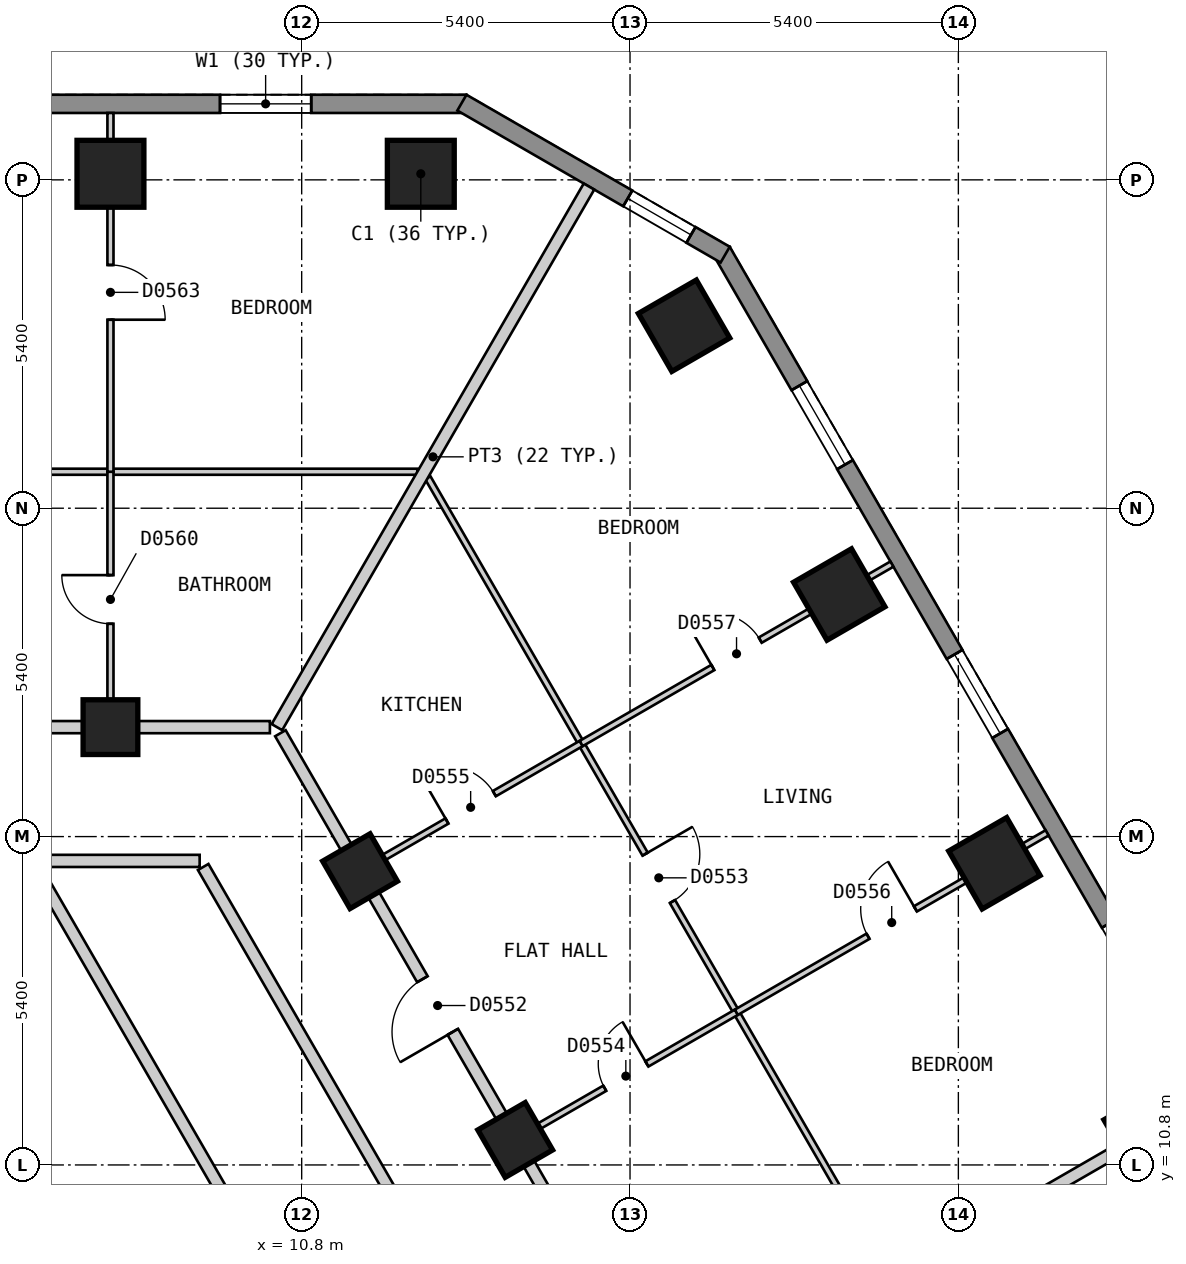
"""IFC4 building model, lengths in metres.
Left out: names, types, materials, properties, quantities, classifications, styles, units other than length and angle.
Written with IfcOpenShell. Run it as: python <this file> out.ifc"""

import sys

from ifc_helpers import new_model, si_unit, direction, frame, frame_2d, origin, origin_2d, place, context, subcontext, project, spatial, polyline, rectangle, outline, extrude, element, fill, save


model = new_model("IFC4")
c1 = context("Model", 3, precision=1e-05, world=origin(), true_north=direction((0.0, 1.0)))
c2 = subcontext(c1, "Body", "Model", "MODEL_VIEW")
j1 = project(units=[si_unit("LENGTHUNIT", "METRE"), si_unit("PLANEANGLEUNIT", "RADIAN")], contexts=[c1])
p1 = place(None, origin())
s1 = spatial("IfcSite", under=j1, at=p1, CompositionType="ELEMENT")
p2 = place(p1, origin())
s2 = spatial("IfcBuilding", under=s1, at=p2, CompositionType="ELEMENT")
p3 = place(p2, frame((0.0, 0.0, 56.4)))
s3 = spatial("IfcBuildingStorey", under=s2, at=p3, CompositionType="ELEMENT", Elevation=56.4)
for number, where, z_axis, x_axis in (
    (1, (12.759, 27.1, 0.0), (0.0, 0.0, 1.0), (-1.0, 0.0, 0.0)),
    (2, (7.655, 27.1, 0.0), (0.0, 0.0, 1.0), (-1.0, 0.0, 0.0)),
    (3, (24.745, 11.341, 0.0), (0.0, 0.0, 1.0), (-0.5, 0.866, 0.0)),
    (4, (22.193, 15.761, 0.0), (0.0, 0.0, 1.0), (-0.5, 0.866, 0.0)),
    (5, (19.641, 20.181, 0.0), (0.0, 0.0, 1.0), (-0.5, 0.866, 0.0)),
    (6, (17.089, 24.601, 0.0), (0.0, 0.0, 1.0), (-0.5, 0.866, 0.0)),
):
    element("IfcColumn", number, at=place(p3, frame(where, z_axis=z_axis, x_axis=x_axis)), inside=s3, PredefinedType="COLUMN", context=c2, shape_type="SweptSolid", body=[
        extrude(rectangle(XDim=1.1, YDim=1.1, at=origin_2d()), origin(), (0.0, 0.0, 1.0), 3.0),
    ])
for number, where, z_axis, x_axis in (
    (7, (14.312, 11.211, 0.0), (0.0, 0.0, 1.0), (-0.5, 0.866, 0.0)),
    (8, (11.76, 15.631, 0.0), (0.0, 0.0, 1.0), (-0.5, 0.866, 0.0)),
    (9, (7.655, 18.0, 0.0), (0.0, 0.0, 1.0), (-1.0, 0.0, 0.0)),
):
    element("IfcColumn", number, at=place(p3, frame(where, z_axis=z_axis, x_axis=x_axis)), inside=s3, PredefinedType="COLUMN", context=c2, shape_type="SweptSolid", body=[
        extrude(rectangle(XDim=0.9, YDim=0.9, at=origin_2d()), origin(), (0.0, 0.0, 1.0), 3.0),
    ])
p4 = place(p3, frame((13.51, 28.25, 0.0), z_axis=(0.0, 0.0, 1.0), x_axis=(-1.0, 0.0, 0.0)))
e10 = element("IfcWall", 10, at=p4, inside=s3, PredefinedType="SOLIDWALL", context=c2, shape_type="SweptSolid", body=[
    extrude(outline(polyline([(0.0, -0.15), (27.02, -0.15), (26.94, 0.15), (0.08, 0.15), (0.0, -0.15)])), origin(), (0.0, 0.0, 1.0), 2.7),
])
p5 = place(p4, frame((2.553, 0.0, 0.15)))
e11 = element("IfcOpeningElement", 11, at=p5, cuts=e10, PredefinedType="OPENING", context=c2, shape_type="SweptSolid", body=[
    extrude(rectangle(XDim=1.5, YDim=2.1, at=frame_2d((0.75, 1.05))), frame((0.0, 0.16, 0.0), z_axis=(0.0, -1.0, 0.0), x_axis=(1.0, 0.0, 0.0)), (0.0, 0.0, 1.0), 0.32),
])
p6 = place(p4, frame((7.657, 0.0, 0.15)))
e12 = element("IfcOpeningElement", 12, at=p6, cuts=e10, PredefinedType="OPENING", context=c2, shape_type="SweptSolid", body=[
    extrude(rectangle(XDim=1.5, YDim=2.1, at=frame_2d((0.75, 1.05))), frame((0.0, 0.16, 0.0), z_axis=(0.0, -1.0, 0.0), x_axis=(1.0, 0.0, 0.0)), (0.0, 0.0, 1.0), 0.32),
])
p7 = place(p4, frame((12.761, 0.0, 0.15)))
e13 = element("IfcOpeningElement", 13, at=p7, cuts=e10, PredefinedType="OPENING", context=c2, shape_type="SweptSolid", body=[
    extrude(rectangle(XDim=1.5, YDim=2.1, at=frame_2d((0.75, 1.05))), frame((0.0, 0.16, 0.0), z_axis=(0.0, -1.0, 0.0), x_axis=(1.0, 0.0, 0.0)), (0.0, 0.0, 1.0), 0.32),
])
p8 = place(p4, frame((17.865, 0.0, 0.15)))
e14 = element("IfcOpeningElement", 14, at=p8, cuts=e10, PredefinedType="OPENING", context=c2, shape_type="SweptSolid", body=[
    extrude(rectangle(XDim=1.5, YDim=2.1, at=frame_2d((0.75, 1.05))), frame((0.0, 0.16, 0.0), z_axis=(0.0, -1.0, 0.0), x_axis=(1.0, 0.0, 0.0)), (0.0, 0.0, 1.0), 0.32),
])
p9 = place(p4, frame((22.969, 0.0, 0.15)))
e15 = element("IfcOpeningElement", 15, at=p9, cuts=e10, PredefinedType="OPENING", context=c2, shape_type="SweptSolid", body=[
    extrude(rectangle(XDim=1.5, YDim=2.1, at=frame_2d((0.75, 1.05))), frame((0.0, 0.16, 0.0), z_axis=(0.0, -1.0, 0.0), x_axis=(1.0, 0.0, 0.0)), (0.0, 0.0, 1.0), 0.32),
])
p10 = place(p3, frame((31.22, 2.425, 0.0), z_axis=(0.0, 0.0, 1.0), x_axis=(-0.500001938803, 0.866024284413, 0.0)))
e16 = element("IfcWall", 16, at=p10, inside=s3, PredefinedType="SOLIDWALL", context=c2, shape_type="SweptSolid", body=[
    extrude(outline(polyline([(0.0, -0.15), (27.02, -0.15), (26.94, 0.15), (0.08, 0.15), (0.0, -0.15)])), origin(), (0.0, 0.0, 1.0), 2.7),
])
p11 = place(p10, frame((2.553, 0.0, 0.15)))
e17 = element("IfcOpeningElement", 17, at=p11, cuts=e16, PredefinedType="OPENING", context=c2, shape_type="SweptSolid", body=[
    extrude(rectangle(XDim=1.5, YDim=2.1, at=frame_2d((0.75, 1.05))), frame((0.0, 0.16, 0.0), z_axis=(0.0, -1.0, 0.0), x_axis=(1.0, 0.0, 0.0)), (0.0, 0.0, 1.0), 0.32),
])
p12 = place(p10, frame((7.657, 0.0, 0.15)))
e18 = element("IfcOpeningElement", 18, at=p12, cuts=e16, PredefinedType="OPENING", context=c2, shape_type="SweptSolid", body=[
    extrude(rectangle(XDim=1.5, YDim=2.1, at=frame_2d((0.75, 1.05))), frame((0.0, 0.16, 0.0), z_axis=(0.0, -1.0, 0.0), x_axis=(1.0, 0.0, 0.0)), (0.0, 0.0, 1.0), 0.32),
])
p13 = place(p10, frame((12.761, 0.0, 0.15)))
e19 = element("IfcOpeningElement", 19, at=p13, cuts=e16, PredefinedType="OPENING", context=c2, shape_type="SweptSolid", body=[
    extrude(rectangle(XDim=1.5, YDim=2.1, at=frame_2d((0.75, 1.05))), frame((0.0, 0.16, 0.0), z_axis=(0.0, -1.0, 0.0), x_axis=(1.0, 0.0, 0.0)), (0.0, 0.0, 1.0), 0.32),
])
p14 = place(p10, frame((17.865, 0.0, 0.15)))
e20 = element("IfcOpeningElement", 20, at=p14, cuts=e16, PredefinedType="OPENING", context=c2, shape_type="SweptSolid", body=[
    extrude(rectangle(XDim=1.5, YDim=2.1, at=frame_2d((0.75, 1.05))), frame((0.0, 0.16, 0.0), z_axis=(0.0, -1.0, 0.0), x_axis=(1.0, 0.0, 0.0)), (0.0, 0.0, 1.0), 0.32),
])
p15 = place(p10, frame((22.969, 0.0, 0.15)))
e21 = element("IfcOpeningElement", 21, at=p15, cuts=e16, PredefinedType="OPENING", context=c2, shape_type="SweptSolid", body=[
    extrude(rectangle(XDim=1.5, YDim=2.1, at=frame_2d((0.75, 1.05))), frame((0.0, 0.16, 0.0), z_axis=(0.0, -1.0, 0.0), x_axis=(1.0, 0.0, 0.0)), (0.0, 0.0, 1.0), 0.32),
])
p16 = place(p3, frame((17.765, 25.77, 0.0), z_axis=(0.0, 0.0, 1.0), x_axis=(-0.866010750942, 0.50002537861, 0.0)))
e22 = element("IfcWall", 22, at=p16, inside=s3, PredefinedType="SOLIDWALL", context=c2, shape_type="SweptSolid", body=[
    extrude(outline(polyline([(0.0, -0.15), (5.0, -0.15), (4.919, 0.15), (0.08, 0.15), (0.0, -0.15)])), origin(), (0.0, 0.0, 1.0), 2.7),
])
p17 = place(p16, frame((0.65, 0.0, 0.15)))
e23 = element("IfcOpeningElement", 23, at=p17, cuts=e22, PredefinedType="OPENING", context=c2, shape_type="SweptSolid", body=[
    extrude(rectangle(XDim=1.2, YDim=2.1, at=frame_2d((0.6, 1.05))), frame((0.0, 0.16, 0.0), z_axis=(0.0, -1.0, 0.0), x_axis=(1.0, 0.0, 0.0)), (0.0, 0.0, 1.0), 0.32),
])
p18 = place(p3, frame((6.409, 15.7, 0.0), z_axis=(0.0, 0.0, 1.0), x_axis=(0.499930377127, -0.866065596838, 0.0)))
e24 = element("IfcWall", 24, at=p18, inside=s3, PredefinedType="PARTITIONING", context=c2, shape_type="SweptSolid", body=[
    extrude(rectangle(XDim=8.775, YDim=0.2, at=frame_2d((4.388, 0.0))), origin(), (0.0, 0.0, 1.0), 2.7),
])
p19 = place(p3, frame((9.18, 15.7, 0.0), z_axis=(0.0, 0.0, 1.0), x_axis=(0.500003652032, -0.866023295272, 0.0)))
e25 = element("IfcWall", 25, at=p19, inside=s3, PredefinedType="PARTITIONING", context=c2, shape_type="SweptSolid", body=[
    extrude(rectangle(XDim=18.012, YDim=0.2, at=frame_2d((9.006, 0.0))), origin(), (0.0, 0.0, 1.0), 2.7),
])
p20 = place(p19, frame((8.556, 0.0, 0.0)))
e26 = element("IfcOpeningElement", 26, at=p20, cuts=e25, PredefinedType="OPENING", context=c2, shape_type="SweptSolid", body=[
    extrude(rectangle(XDim=0.9, YDim=2.1, at=frame_2d((0.45, 1.05))), frame((0.0, 0.11, 0.0), z_axis=(0.0, -1.0, 0.0), x_axis=(1.0, 0.0, 0.0)), (0.0, 0.0, 1.0), 0.22),
])
p21 = place(p3, frame((10.45, 17.9, 0.0), z_axis=(0.0, 0.0, 1.0), x_axis=(0.500034352617, -0.866005569383, 0.0)))
e27 = element("IfcWall", 27, at=p21, inside=s3, PredefinedType="PARTITIONING", context=c2, shape_type="SweptSolid", body=[
    extrude(rectangle(XDim=20.553, YDim=0.2, at=frame_2d((10.276, 0.0))), origin(), (0.0, 0.0, 1.0), 2.7),
])
p22 = place(p21, frame((14.902, 0.0, 0.0)))
e28 = element("IfcOpeningElement", 28, at=p22, cuts=e27, PredefinedType="OPENING", context=c2, shape_type="SweptSolid", body=[
    extrude(rectangle(XDim=1.0, YDim=2.1, at=frame_2d((0.5, 1.05))), frame((0.0, 0.11, 0.0), z_axis=(0.0, -1.0, 0.0), x_axis=(1.0, 0.0, 0.0)), (0.0, 0.0, 1.0), 0.22),
])
p23 = place(p21, frame((4.671, 0.0, 0.0)))
e29 = element("IfcOpeningElement", 29, at=p23, cuts=e27, PredefinedType="OPENING", context=c2, shape_type="SweptSolid", body=[
    extrude(rectangle(XDim=1.0, YDim=2.1, at=frame_2d((0.5, 1.05))), frame((0.0, 0.11, 0.0), z_axis=(0.0, -1.0, 0.0), x_axis=(1.0, 0.0, 0.0)), (0.0, 0.0, 1.0), 0.22),
])
p24 = place(p3, frame((6.351, 15.8, 0.0), z_axis=(0.0, 0.0, 1.0), x_axis=(1.0, 0.0, 0.0)))
e30 = element("IfcWall", 30, at=p24, inside=s3, PredefinedType="PARTITIONING", context=c2, shape_type="SweptSolid", body=[
    extrude(rectangle(XDim=2.771, YDim=0.2, at=frame_2d((1.385, 0.0))), origin(), (0.0, 0.0, 1.0), 2.7),
])
p25 = place(p3, frame((-10.276, 18.0, 0.0), z_axis=(0.0, 0.0, 1.0), x_axis=(1.0, 0.0, 0.0)))
e31 = element("IfcWall", 31, at=p25, inside=s3, PredefinedType="PARTITIONING", context=c2, shape_type="SweptSolid", body=[
    extrude(rectangle(XDim=20.553, YDim=0.2, at=frame_2d((10.276, 0.0))), origin(), (0.0, 0.0, 1.0), 2.7),
])
p26 = place(p25, frame((14.879, 0.0, 0.0)))
e32 = element("IfcOpeningElement", 32, at=p26, cuts=e31, PredefinedType="OPENING", context=c2, shape_type="SweptSolid", body=[
    extrude(rectangle(XDim=1.0, YDim=2.1, at=frame_2d((0.5, 1.05))), frame((0.0, 0.11, 0.0), z_axis=(0.0, -1.0, 0.0), x_axis=(1.0, 0.0, 0.0)), (0.0, 0.0, 1.0), 0.22),
])
p27 = place(p25, frame((4.671, 0.0, 0.0)))
e33 = element("IfcOpeningElement", 33, at=p27, cuts=e31, PredefinedType="OPENING", context=c2, shape_type="SweptSolid", body=[
    extrude(rectangle(XDim=1.0, YDim=2.1, at=frame_2d((0.5, 1.05))), frame((0.0, 0.11, 0.0), z_axis=(0.0, -1.0, 0.0), x_axis=(1.0, 0.0, 0.0)), (0.0, 0.0, 1.0), 0.22),
])
p28 = place(p3, frame((12.875, 22.1, 0.0), z_axis=(0.0, 0.0, 1.0), x_axis=(0.499994897061, -0.866028349948, 0.0)))
e34 = element("IfcWall", 34, at=p28, inside=s3, PredefinedType="PARTITIONING", context=c2, shape_type="SweptSolid", body=[
    extrude(rectangle(XDim=15.152, YDim=0.1, at=frame_2d((7.576, 0.0))), origin(), (0.0, 0.0, 1.0), 2.7),
])
p29 = place(p28, frame((7.146, 0.0, 0.0)))
e35 = element("IfcOpeningElement", 35, at=p29, cuts=e34, PredefinedType="OPENING", context=c2, shape_type="SweptSolid", body=[
    extrude(rectangle(XDim=0.9, YDim=2.1, at=frame_2d((0.45, 1.05))), frame((0.0, 0.06, 0.0), z_axis=(0.0, -1.0, 0.0), x_axis=(1.0, 0.0, 0.0)), (0.0, 0.0, 1.0), 0.12),
])
p30 = place(p3, frame((-2.453, 22.2, 0.0), z_axis=(0.0, 0.0, 1.0), x_axis=(1.0, 0.0, 0.0)))
e36 = element("IfcWall", 36, at=p30, inside=s3, PredefinedType="PARTITIONING", context=c2, shape_type="SweptSolid", body=[
    extrude(rectangle(XDim=15.155, YDim=0.1, at=frame_2d((7.577, 0.0))), origin(), (0.0, 0.0, 1.0), 2.7),
])
p31 = place(p30, frame((7.106, 0.0, 0.0)))
e37 = element("IfcOpeningElement", 37, at=p31, cuts=e36, PredefinedType="OPENING", context=c2, shape_type="SweptSolid", body=[
    extrude(rectangle(XDim=0.9, YDim=2.1, at=frame_2d((0.45, 1.05))), frame((0.0, 0.06, 0.0), z_axis=(0.0, -1.0, 0.0), x_axis=(1.0, 0.0, 0.0)), (0.0, 0.0, 1.0), 0.12),
])
p32 = place(p3, frame((7.655, 18.1, 0.0), z_axis=(0.0, 0.0, 1.0), x_axis=(0.0, 1.0, 0.0)))
e38 = element("IfcWall", 38, at=p32, inside=s3, PredefinedType="PARTITIONING", context=c2, shape_type="SweptSolid", body=[
    extrude(rectangle(XDim=4.1, YDim=0.1, at=frame_2d((2.05, 0.0))), origin(), (0.0, 0.0, 1.0), 2.7),
])
p33 = place(p32, frame((1.6, 0.0, 0.0)))
e39 = element("IfcOpeningElement", 39, at=p33, cuts=e38, PredefinedType="OPENING", context=c2, shape_type="SweptSolid", body=[
    extrude(rectangle(XDim=0.8, YDim=2.1, at=frame_2d((0.4, 1.05))), frame((0.0, 0.06, 0.0), z_axis=(0.0, -1.0, 0.0), x_axis=(1.0, 0.0, 0.0)), (0.0, 0.0, 1.0), 0.12),
])
p34 = place(p3, frame((11.847, 15.681, 0.0), z_axis=(0.0, 0.0, 1.0), x_axis=(0.865980278416, 0.500078151287, 0.0)))
e40 = element("IfcWall", 40, at=p34, inside=s3, PredefinedType="PARTITIONING", context=c2, shape_type="SweptSolid", body=[
    extrude(rectangle(XDim=4.099, YDim=0.1, at=frame_2d((2.05, 0.0))), origin(), (0.0, 0.0, 1.0), 2.7),
])
p35 = place(p34, frame((1.55, 0.0, 0.0)))
e41 = element("IfcOpeningElement", 41, at=p35, cuts=e40, PredefinedType="OPENING", context=c2, shape_type="SweptSolid", body=[
    extrude(rectangle(XDim=0.9, YDim=2.1, at=frame_2d((0.45, 1.05))), frame((0.0, 0.06, 0.0), z_axis=(0.0, -1.0, 0.0), x_axis=(1.0, 0.0, 0.0)), (0.0, 0.0, 1.0), 0.12),
])
p36 = place(p3, frame((14.399, 11.261, 0.0), z_axis=(0.0, 0.0, 1.0), x_axis=(0.865980278416, 0.500078151287, 0.0)))
e42 = element("IfcWall", 42, at=p36, inside=s3, PredefinedType="PARTITIONING", context=c2, shape_type="SweptSolid", body=[
    extrude(rectangle(XDim=4.099, YDim=0.1, at=frame_2d((2.05, 0.0))), origin(), (0.0, 0.0, 1.0), 2.7),
])
p37 = place(p36, frame((1.6, 0.0, 0.0)))
e43 = element("IfcOpeningElement", 43, at=p37, cuts=e42, PredefinedType="OPENING", context=c2, shape_type="SweptSolid", body=[
    extrude(rectangle(XDim=0.8, YDim=2.1, at=frame_2d((0.4, 1.05))), frame((0.0, 0.06, 0.0), z_axis=(0.0, -1.0, 0.0), x_axis=(1.0, 0.0, 0.0)), (0.0, 0.0, 1.0), 0.12),
])
p38 = place(p3, frame((10.393, 18.0, 0.0), z_axis=(0.0, 0.0, 1.0), x_axis=(0.499945497007, 0.866056868816, 0.0)))
e44 = element("IfcWall", 44, at=p38, inside=s3, PredefinedType="PARTITIONING", context=c2, shape_type="SweptSolid", body=[
    extrude(rectangle(XDim=10.265, YDim=0.2, at=frame_2d((5.132, 0.0))), origin(), (0.0, 0.0, 1.0), 2.7),
])
p39 = place(p3, frame((20.484, 8.881, 0.0), z_axis=(0.0, 0.0, 1.0), x_axis=(0.866000821391, 0.500042575537, 0.0)))
e45 = element("IfcWall", 45, at=p39, inside=s3, PredefinedType="PARTITIONING", context=c2, shape_type="SweptSolid", body=[
    extrude(rectangle(XDim=5.919, YDim=0.2, at=frame_2d((2.96, 0.0))), origin(), (0.0, 0.0, 1.0), 2.7),
])
p40 = place(p3, frame((15.397, 17.731, 0.0), z_axis=(0.0, 0.0, 1.0), x_axis=(0.866052608538, 0.499952877023, 0.0)))
e46 = element("IfcWall", 46, at=p40, inside=s3, PredefinedType="PARTITIONING", context=c2, shape_type="SweptSolid", body=[
    extrude(rectangle(XDim=5.9, YDim=0.1, at=frame_2d((2.95, 0.0))), origin(), (0.0, 0.0, 1.0), 2.7),
])
p41 = place(p40, frame((2.5, 0.0, 0.0)))
e47 = element("IfcOpeningElement", 47, at=p41, cuts=e46, PredefinedType="OPENING", context=c2, shape_type="SweptSolid", body=[
    extrude(rectangle(XDim=0.9, YDim=2.1, at=frame_2d((0.45, 1.05))), frame((0.0, 0.06, 0.0), z_axis=(0.0, -1.0, 0.0), x_axis=(1.0, 0.0, 0.0)), (0.0, 0.0, 1.0), 0.12),
])
p42 = place(p3, frame((17.949, 13.311, 0.0), z_axis=(0.0, 0.0, 1.0), x_axis=(0.866052608538, 0.499952877023, 0.0)))
e48 = element("IfcWall", 48, at=p42, inside=s3, PredefinedType="PARTITIONING", context=c2, shape_type="SweptSolid", body=[
    extrude(rectangle(XDim=5.9, YDim=0.1, at=frame_2d((2.95, 0.0))), origin(), (0.0, 0.0, 1.0), 2.7),
])
p43 = place(p42, frame((2.5, 0.0, 0.0)))
e49 = element("IfcOpeningElement", 49, at=p43, cuts=e48, PredefinedType="OPENING", context=c2, shape_type="SweptSolid", body=[
    extrude(rectangle(XDim=0.9, YDim=2.1, at=frame_2d((0.45, 1.05))), frame((0.0, 0.06, 0.0), z_axis=(0.0, -1.0, 0.0), x_axis=(1.0, 0.0, 0.0)), (0.0, 0.0, 1.0), 0.12),
])
p44 = place(p3, frame((7.655, 22.2, 0.0), z_axis=(0.0, 0.0, 1.0), x_axis=(0.0, 1.0, 0.0)))
e50 = element("IfcWall", 50, at=p44, inside=s3, PredefinedType="PARTITIONING", context=c2, shape_type="SweptSolid", body=[
    extrude(rectangle(XDim=5.9, YDim=0.1, at=frame_2d((2.95, 0.0))), origin(), (0.0, 0.0, 1.0), 2.7),
])
p45 = place(p44, frame((2.5, 0.0, 0.0)))
e51 = element("IfcOpeningElement", 51, at=p45, cuts=e50, PredefinedType="OPENING", context=c2, shape_type="SweptSolid", body=[
    extrude(rectangle(XDim=0.9, YDim=2.1, at=frame_2d((0.45, 1.05))), frame((0.0, 0.06, 0.0), z_axis=(0.0, -1.0, 0.0), x_axis=(1.0, 0.0, 0.0)), (0.0, 0.0, 1.0), 0.12),
])
p46 = place(p5, origin())
e52 = element("IfcWindow", 52, at=p46, inside=s3, PartitioningType="SINGLE_PANEL", PredefinedType="WINDOW", context=c2, shape_type="SweptSolid", body=[
    extrude(rectangle(XDim=1.5, YDim=2.1, at=frame_2d((0.75, 1.05))), frame((0.0, 0.03, 0.0), z_axis=(0.0, -1.0, 0.0), x_axis=(1.0, 0.0, 0.0)), (0.0, 0.0, 1.0), 0.06),
])
fill(e11, e52)
p47 = place(p14, origin())
e53 = element("IfcWindow", 53, at=p47, inside=s3, PartitioningType="SINGLE_PANEL", PredefinedType="WINDOW", context=c2, shape_type="SweptSolid", body=[
    extrude(rectangle(XDim=1.5, YDim=2.1, at=frame_2d((0.75, 1.05))), frame((0.0, 0.03, 0.0), z_axis=(0.0, -1.0, 0.0), x_axis=(1.0, 0.0, 0.0)), (0.0, 0.0, 1.0), 0.06),
])
fill(e20, e53)
p48 = place(p15, origin())
e54 = element("IfcWindow", 54, at=p48, inside=s3, PartitioningType="SINGLE_PANEL", PredefinedType="WINDOW", context=c2, shape_type="SweptSolid", body=[
    extrude(rectangle(XDim=1.5, YDim=2.1, at=frame_2d((0.75, 1.05))), frame((0.0, 0.03, 0.0), z_axis=(0.0, -1.0, 0.0), x_axis=(1.0, 0.0, 0.0)), (0.0, 0.0, 1.0), 0.06),
])
fill(e21, e54)
p49 = place(p17, origin())
e55 = element("IfcWindow", 55, at=p49, inside=s3, PartitioningType="SINGLE_PANEL", PredefinedType="WINDOW", context=c2, shape_type="SweptSolid", body=[
    extrude(rectangle(XDim=1.2, YDim=2.1, at=frame_2d((0.6, 1.05))), frame((0.0, 0.03, 0.0), z_axis=(0.0, -1.0, 0.0), x_axis=(1.0, 0.0, 0.0)), (0.0, 0.0, 1.0), 0.06),
])
fill(e23, e55)
p50 = place(p23, origin())
e56 = element("IfcDoor", 56, at=p50, inside=s3, OperationType="SINGLE_SWING_RIGHT", PredefinedType="DOOR", context=c2, shape_type="SweptSolid", body=[
    extrude(rectangle(XDim=1.0, YDim=2.1, at=frame_2d((0.5, 1.05))), frame((0.0, 0.025, 0.0), z_axis=(0.0, -1.0, 0.0), x_axis=(1.0, 0.0, 0.0)), (0.0, 0.0, 1.0), 0.05),
])
fill(e29, e56)
p51 = place(p29, origin())
e57 = element("IfcDoor", 57, at=p51, inside=s3, OperationType="SINGLE_SWING_LEFT", PredefinedType="DOOR", context=c2, shape_type="SweptSolid", body=[
    extrude(rectangle(XDim=0.9, YDim=2.1, at=frame_2d((0.45, 1.05))), frame((0.0, 0.025, 0.0), z_axis=(0.0, -1.0, 0.0), x_axis=(1.0, 0.0, 0.0)), (0.0, 0.0, 1.0), 0.05),
])
fill(e35, e57)
p52 = place(p37, origin())
e58 = element("IfcDoor", 58, at=p52, inside=s3, OperationType="SINGLE_SWING_RIGHT", PredefinedType="DOOR", context=c2, shape_type="SweptSolid", body=[
    extrude(rectangle(XDim=0.8, YDim=2.1, at=frame_2d((0.4, 1.05))), frame((0.0, 0.025, 0.0), z_axis=(0.0, -1.0, 0.0), x_axis=(1.0, 0.0, 0.0)), (0.0, 0.0, 1.0), 0.05),
])
fill(e43, e58)
p53 = place(p35, origin())
e59 = element("IfcDoor", 59, at=p53, inside=s3, OperationType="SINGLE_SWING_LEFT", PredefinedType="DOOR", context=c2, shape_type="SweptSolid", body=[
    extrude(rectangle(XDim=0.9, YDim=2.1, at=frame_2d((0.45, 1.05))), frame((0.0, 0.025, 0.0), z_axis=(0.0, -1.0, 0.0), x_axis=(1.0, 0.0, 0.0)), (0.0, 0.0, 1.0), 0.05),
])
fill(e41, e59)
p54 = place(p43, origin())
e60 = element("IfcDoor", 60, at=p54, inside=s3, OperationType="SINGLE_SWING_RIGHT", PredefinedType="DOOR", context=c2, shape_type="SweptSolid", body=[
    extrude(rectangle(XDim=0.9, YDim=2.1, at=frame_2d((0.45, 1.05))), frame((0.0, 0.025, 0.0), z_axis=(0.0, -1.0, 0.0), x_axis=(1.0, 0.0, 0.0)), (0.0, 0.0, 1.0), 0.05),
])
fill(e49, e60)
p55 = place(p41, origin())
e61 = element("IfcDoor", 61, at=p55, inside=s3, OperationType="SINGLE_SWING_LEFT", PredefinedType="DOOR", context=c2, shape_type="SweptSolid", body=[
    extrude(rectangle(XDim=0.9, YDim=2.1, at=frame_2d((0.45, 1.05))), frame((0.0, 0.025, 0.0), z_axis=(0.0, -1.0, 0.0), x_axis=(1.0, 0.0, 0.0)), (0.0, 0.0, 1.0), 0.05),
])
fill(e47, e61)
p56 = place(p33, origin())
e62 = element("IfcDoor", 62, at=p56, inside=s3, OperationType="SINGLE_SWING_RIGHT", PredefinedType="DOOR", context=c2, shape_type="SweptSolid", body=[
    extrude(rectangle(XDim=0.8, YDim=2.1, at=frame_2d((0.4, 1.05))), frame((0.0, 0.025, 0.0), z_axis=(0.0, -1.0, 0.0), x_axis=(1.0, 0.0, 0.0)), (0.0, 0.0, 1.0), 0.05),
])
fill(e39, e62)
p57 = place(p45, origin())
e63 = element("IfcDoor", 63, at=p57, inside=s3, OperationType="SINGLE_SWING_LEFT", PredefinedType="DOOR", context=c2, shape_type="SweptSolid", body=[
    extrude(rectangle(XDim=0.9, YDim=2.1, at=frame_2d((0.45, 1.05))), frame((0.0, 0.025, 0.0), z_axis=(0.0, -1.0, 0.0), x_axis=(1.0, 0.0, 0.0)), (0.0, 0.0, 1.0), 0.05),
])
fill(e51, e63)
save(model, sys.argv[1])
